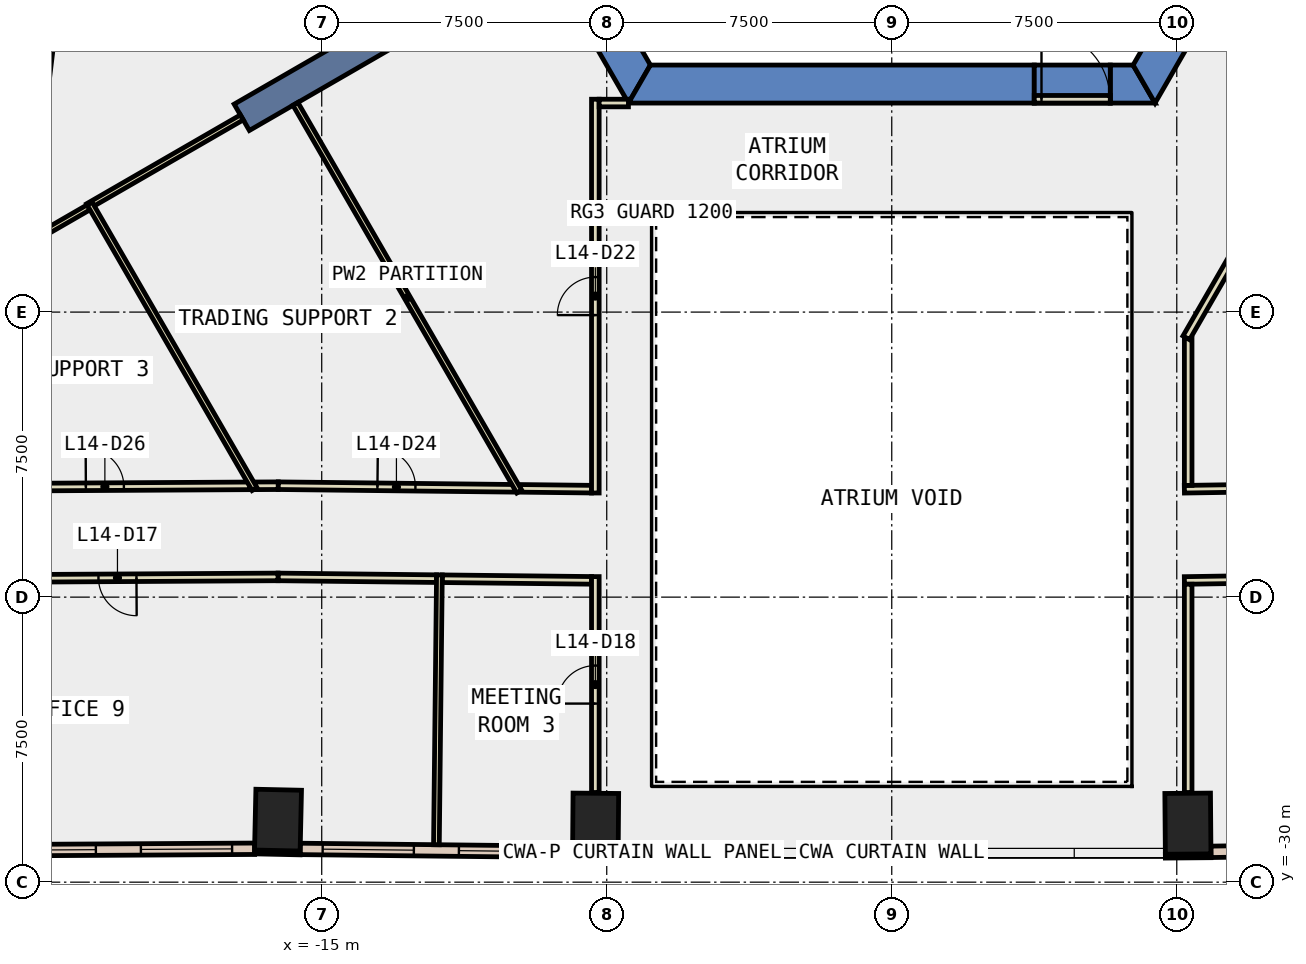
"""IFC4 building model, lengths in metres.
Left out: names, types, materials, properties, quantities, classifications, styles, units other than length and angle.
Written with IfcOpenShell. Run it as: python <this file> out.ifc"""

import sys

from ifc_helpers import new_model, si_unit, direction, frame, frame_2d, origin, origin_2d, place, context, subcontext, project, spatial, polyline, rectangle, outline, extrude, element, fill, save


model = new_model("IFC4")
c1 = context("Model", 3, precision=1e-05, world=origin(), true_north=direction((0.0, 1.0)))
c2 = subcontext(c1, "Body", "Model", "MODEL_VIEW")
j1 = project(units=[si_unit("LENGTHUNIT", "METRE"), si_unit("PLANEANGLEUNIT", "RADIAN")], contexts=[c1])
p1 = place(None, origin())
s1 = spatial("IfcSite", under=j1, at=p1, CompositionType="ELEMENT")
p2 = place(p1, origin())
s2 = spatial("IfcBuilding", under=s1, at=p2, CompositionType="ELEMENT")
p3 = place(p2, frame((0.0, 0.0, 68.6)))
s3 = spatial("IfcBuildingStorey", under=s2, at=p3, CompositionType="ELEMENT", Elevation=68.6)
for number, where, z_axis, x_axis in (
    (1, (-16.15, -28.368, -0.4), (0.0, 0.0, 1.0), (-1.0, 0.022, 0.0)),
    (2, (-7.793, -28.461, -0.4), (0.0, 0.0, 1.0), (-1.0, 0.008, 0.0)),
    (3, (7.793, -28.461, -0.4), (0.0, 0.0, 1.0), (1.0, 0.008, 0.0)),
):
    element("IfcColumn", number, at=place(p3, frame(where, z_axis=z_axis, x_axis=x_axis)), inside=s3, PredefinedType="COLUMN", context=c2, shape_type="SweptSolid", body=[
        extrude(rectangle(XDim=1.2, YDim=1.6, at=origin_2d()), origin(), (0.0, 0.0, 1.0), 4.2),
    ])
p4 = place(p3, frame((0.0, 0.0, -0.4)))
e4 = element("IfcWall", 4, at=p4, inside=s3, PredefinedType="SHEAR", context=c2, shape_type="SweptSolid", body=[
    extrude(outline(polyline([(-13.856, 2.5), (-6.928, -9.5), (-6.351, -8.5), (-12.702, 2.5), (-13.856, 2.5)])), origin(), (0.0, 0.0, 1.0), 4.2),
])
p5 = place(p3, frame((0.0, 0.0, -0.4)))
e5 = element("IfcWall", 5, at=p5, inside=s3, PredefinedType="SHEAR", context=c2, shape_type="SweptSolid", body=[
    extrude(outline(polyline([(3.75, -9.5), (3.75, -8.5), (-6.351, -8.5), (-6.928, -9.5), (3.75, -9.5)])), origin(), (0.0, 0.0, 1.0), 4.2),
])
p6 = place(p3, frame((0.0, 0.0, -0.4)))
e6 = element("IfcWall", 6, at=p6, inside=s3, PredefinedType="SHEAR", context=c2, shape_type="SweptSolid", body=[
    extrude(outline(polyline([(5.75, -8.5), (5.75, -9.5), (6.928, -9.5), (6.351, -8.5), (5.75, -8.5)])), origin(), (0.0, 0.0, 1.0), 4.2),
])
p7 = place(p3, frame((0.0, 0.0, 3.6)))
e7 = element("IfcWall", 7, at=p7, inside=s3, PredefinedType="SHEAR", context=c2, shape_type="SweptSolid", body=[
    extrude(outline(polyline([(5.75, -9.5), (5.75, -8.5), (3.75, -8.5), (3.75, -9.5), (5.75, -9.5)])), origin(), (0.0, 0.0, 1.0), 0.2),
])
p8 = place(p3, frame((0.0, 0.0, -0.4)))
e8 = element("IfcWall", 8, at=p8, inside=s3, PredefinedType="SHEAR", context=c2, shape_type="SweptSolid", body=[
    extrude(outline(polyline([(8.117, -7.44), (7.252, -6.94), (6.351, -8.5), (6.928, -9.5), (8.117, -7.44)])), origin(), (0.0, 0.0, 1.0), 4.2),
])
p9 = place(p3, frame((-9.31, -5.375, -0.4), z_axis=(0.0, 0.0, 1.0), x_axis=(-0.866017533419, -0.500013631625, 0.0)))
e9 = element("IfcWall", 9, at=p9, inside=s3, PredefinedType="SHEAR", context=c2, shape_type="SweptSolid", body=[
    extrude(rectangle(XDim=9.0, YDim=0.8, at=frame_2d((4.5, 0.0))), origin(), (0.0, 0.0, 1.0), 4.2),
])
p10 = place(p3, frame((-16.769, -29.205, 0.0), z_axis=(0.0, 0.0, 1.0), x_axis=(0.99976752127, -0.021561618973, 0.0)))
e10 = element("IfcWall", 10, at=p10, inside=s3, PredefinedType="STANDARD", context=c2, shape_type="SweptSolid", body=[
    extrude(rectangle(XDim=1.2, YDim=0.1, at=frame_2d((0.6, 0.0))), origin(), (0.0, 0.0, 1.0), 3.8),
])
for number, where, z_axis, x_axis in (
    (11, (-8.4, -29.306, 0.0), (0.0, 0.0, 1.0), (1.0, -0.008, 0.0)),
    (12, (7.2, -29.316, 0.0), (0.0, 0.0, 1.0), (1.0, 0.008, 0.0)),
):
    element("IfcWall", number, at=place(p3, frame(where, z_axis=z_axis, x_axis=x_axis)), inside=s3, PredefinedType="STANDARD", context=c2, shape_type="SweptSolid", body=[
        extrude(rectangle(XDim=1.2, YDim=0.1, at=frame_2d((0.6, 0.0))), origin(), (0.0, 0.0, 1.0), 3.8),
    ])
p11 = place(p3, frame((-23.936, -29.162, 0.0), z_axis=(0.0, 0.0, 1.0), x_axis=(0.999983638272, 0.005720418525, 0.0)))
e13 = element("IfcWall", 13, at=p11, inside=s3, PredefinedType="STANDARD", context=c2, shape_type="SweptSolid", body=[
    extrude(rectangle(XDim=7.17, YDim=0.3, at=frame_2d((3.585, 0.0))), origin(), (0.0, 0.0, 1.0), 3.8),
])
p12 = place(p11, frame((0.593, 0.0, 0.9)))
e14 = element("IfcOpeningElement", 14, at=p12, cuts=e13, PredefinedType="OPENING", context=c2, shape_type="SweptSolid", body=[
    extrude(rectangle(XDim=2.4, YDim=2.6, at=frame_2d((1.2, 1.3))), frame((0.0, 0.16, 0.0), z_axis=(0.0, -1.0, 0.0), x_axis=(1.0, 0.0, 0.0)), (0.0, 0.0, 1.0), 0.32),
])
p13 = place(p11, frame((4.178, 0.0, 0.9)))
e15 = element("IfcOpeningElement", 15, at=p13, cuts=e13, PredefinedType="OPENING", context=c2, shape_type="SweptSolid", body=[
    extrude(rectangle(XDim=2.4, YDim=2.6, at=frame_2d((1.2, 1.3))), frame((0.0, 0.16, 0.0), z_axis=(0.0, -1.0, 0.0), x_axis=(1.0, 0.0, 0.0)), (0.0, 0.0, 1.0), 0.32),
])
p14 = place(p3, frame((-15.568, -29.125, 0.0), z_axis=(0.0, 0.0, 1.0), x_axis=(0.999939152594, -0.011031369316, 0.0)))
e16 = element("IfcWall", 16, at=p14, inside=s3, PredefinedType="STANDARD", context=c2, shape_type="SweptSolid", body=[
    extrude(rectangle(XDim=7.171, YDim=0.3, at=frame_2d((3.585, 0.0))), origin(), (0.0, 0.0, 1.0), 3.8),
])
p15 = place(p14, frame((0.593, 0.0, 0.9)))
e17 = element("IfcOpeningElement", 17, at=p15, cuts=e16, PredefinedType="OPENING", context=c2, shape_type="SweptSolid", body=[
    extrude(rectangle(XDim=2.4, YDim=2.6, at=frame_2d((1.2, 1.3))), frame((0.0, 0.16, 0.0), z_axis=(0.0, -1.0, 0.0), x_axis=(1.0, 0.0, 0.0)), (0.0, 0.0, 1.0), 0.32),
])
p16 = place(p14, frame((4.178, 0.0, 0.9)))
e18 = element("IfcOpeningElement", 18, at=p16, cuts=e16, PredefinedType="OPENING", context=c2, shape_type="SweptSolid", body=[
    extrude(rectangle(XDim=2.4, YDim=2.6, at=frame_2d((1.2, 1.3))), frame((0.0, 0.16, 0.0), z_axis=(0.0, -1.0, 0.0), x_axis=(1.0, 0.0, 0.0)), (0.0, 0.0, 1.0), 0.32),
])
p17 = place(p3, frame((8.398, -29.202, 0.0), z_axis=(0.0, 0.0, 1.0), x_axis=(0.99988053916, 0.015456629942, 0.0)))
e19 = element("IfcWall", 19, at=p17, inside=s3, PredefinedType="STANDARD", context=c2, shape_type="SweptSolid", body=[
    extrude(rectangle(XDim=7.171, YDim=0.3, at=frame_2d((3.585, 0.0))), origin(), (0.0, 0.0, 1.0), 3.8),
])
p18 = place(p17, frame((0.593, 0.0, 0.9)))
e20 = element("IfcOpeningElement", 20, at=p18, cuts=e19, PredefinedType="OPENING", context=c2, shape_type="SweptSolid", body=[
    extrude(rectangle(XDim=2.4, YDim=2.6, at=frame_2d((1.2, 1.3))), frame((0.0, 0.16, 0.0), z_axis=(0.0, -1.0, 0.0), x_axis=(1.0, 0.0, 0.0)), (0.0, 0.0, 1.0), 0.32),
])
p19 = place(p17, frame((4.178, 0.0, 0.9)))
e21 = element("IfcOpeningElement", 21, at=p19, cuts=e19, PredefinedType="OPENING", context=c2, shape_type="SweptSolid", body=[
    extrude(rectangle(XDim=2.4, YDim=2.6, at=frame_2d((1.2, 1.3))), frame((0.0, 0.16, 0.0), z_axis=(0.0, -1.0, 0.0), x_axis=(1.0, 0.0, 0.0)), (0.0, 0.0, 1.0), 0.32),
])
p20 = place(p3, frame((7.7, -19.661, 0.0), z_axis=(0.0, 0.0, 1.0), x_axis=(0.999882138464, 0.015352823245, 0.0)))
e22 = element("IfcWall", 22, at=p20, inside=s3, PredefinedType="PARTITIONING", context=c2, shape_type="SweptSolid", body=[
    extrude(rectangle(XDim=8.269, YDim=0.2, at=frame_2d((4.135, 0.0))), origin(), (0.0, 0.0, 1.0), 3.8),
])
p21 = place(p20, frame((3.235, 0.0, 0.0)))
e23 = element("IfcOpeningElement", 23, at=p21, cuts=e22, PredefinedType="OPENING", context=c2, shape_type="SweptSolid", body=[
    extrude(rectangle(XDim=1.8, YDim=2.1, at=frame_2d((0.9, 1.05))), frame((0.0, 0.11, 0.0), z_axis=(0.0, -1.0, 0.0), x_axis=(1.0, 0.0, 0.0)), (0.0, 0.0, 1.0), 0.22),
])
p22 = place(p3, frame((-9.776, -19.638, 0.0), z_axis=(0.0, 0.0, 1.0), x_axis=(0.999937374473, -0.011191386544, 0.0)))
e24 = element("IfcWall", 24, at=p22, inside=s3, PredefinedType="PARTITIONING", context=c2, shape_type="SweptSolid", body=[
    extrude(rectangle(XDim=1.876, YDim=0.2, at=frame_2d((0.938, 0.0))), origin(), (0.0, 0.0, 1.0), 3.8),
])
p23 = place(p3, frame((-16.742, -19.571, 0.0), z_axis=(0.0, 0.0, 1.0), x_axis=(0.999988034534, 0.004891910483, 0.0)))
e25 = element("IfcWall", 25, at=p23, inside=s3, PredefinedType="PARTITIONING", context=c2, shape_type="SweptSolid", body=[
    extrude(rectangle(XDim=0.599, YDim=0.2, at=frame_2d((0.299, 0.0))), origin(), (0.0, 0.0, 1.0), 3.8),
])
p24 = place(p3, frame((-16.143, -19.568, 0.0), z_axis=(0.0, 0.0, 1.0), x_axis=(0.999938688645, -0.011073344206, 0.0)))
e26 = element("IfcWall", 26, at=p24, inside=s3, PredefinedType="PARTITIONING", context=c2, shape_type="SweptSolid", body=[
    extrude(rectangle(XDim=6.218, YDim=0.2, at=frame_2d((3.109, 0.0))), origin(), (0.0, 0.0, 1.0), 3.8),
])
p25 = place(p24, frame((2.609, 0.0, 0.0)))
e27 = element("IfcOpeningElement", 27, at=p25, cuts=e26, PredefinedType="OPENING", context=c2, shape_type="SweptSolid", body=[
    extrude(rectangle(XDim=1.0, YDim=2.1, at=frame_2d((0.5, 1.05))), frame((0.0, 0.11, 0.0), z_axis=(0.0, -1.0, 0.0), x_axis=(1.0, 0.0, 0.0)), (0.0, 0.0, 1.0), 0.22),
])
p26 = place(p3, frame((-24.52, -19.615, 0.0), z_axis=(0.0, 0.0, 1.0), x_axis=(0.999984134574, 0.00563299218, 0.0)))
e28 = element("IfcWall", 28, at=p26, inside=s3, PredefinedType="PARTITIONING", context=c2, shape_type="SweptSolid", body=[
    extrude(rectangle(XDim=7.628, YDim=0.2, at=frame_2d((3.814, 0.0))), origin(), (0.0, 0.0, 1.0), 3.8),
])
p27 = place(p26, frame((3.314, 0.0, 0.0)))
e29 = element("IfcOpeningElement", 29, at=p27, cuts=e28, PredefinedType="OPENING", context=c2, shape_type="SweptSolid", body=[
    extrude(rectangle(XDim=1.0, YDim=2.1, at=frame_2d((0.5, 1.05))), frame((0.0, 0.11, 0.0), z_axis=(0.0, -1.0, 0.0), x_axis=(1.0, 0.0, 0.0)), (0.0, 0.0, 1.0), 0.22),
])
p28 = place(p3, frame((16.018, -21.933, 0.0), z_axis=(0.0, 0.0, 1.0), x_axis=(-0.999879942341, -0.015495189738, 0.0)))
e30 = element("IfcWall", 30, at=p28, inside=s3, PredefinedType="PARTITIONING", context=c2, shape_type="SweptSolid", body=[
    extrude(rectangle(XDim=8.319, YDim=0.2, at=frame_2d((4.16, 0.0))), origin(), (0.0, 0.0, 1.0), 3.8),
])
p29 = place(p28, frame((3.66, 0.0, 0.0)))
e31 = element("IfcOpeningElement", 31, at=p29, cuts=e30, PredefinedType="OPENING", context=c2, shape_type="SweptSolid", body=[
    extrude(rectangle(XDim=1.0, YDim=2.1, at=frame_2d((0.5, 1.05))), frame((0.0, 0.11, 0.0), z_axis=(0.0, -1.0, 0.0), x_axis=(1.0, 0.0, 0.0)), (0.0, 0.0, 1.0), 0.22),
])
p30 = place(p3, frame((-11.979, -22.014, 0.0), z_axis=(0.0, 0.0, 1.0), x_axis=(-0.999939456554, 0.01100378236, 0.0)))
e32 = element("IfcWall", 32, at=p30, inside=s3, PredefinedType="PARTITIONING", context=c2, shape_type="SweptSolid", body=[
    extrude(rectangle(XDim=4.171, YDim=0.2, at=frame_2d((2.085, 0.0))), origin(), (0.0, 0.0, 1.0), 3.8),
])
p31 = place(p3, frame((-16.15, -21.968, 0.0), z_axis=(0.0, 0.0, 1.0), x_axis=(-0.99998433708, -0.00559692726, 0.0)))
e33 = element("IfcWall", 33, at=p31, inside=s3, PredefinedType="PARTITIONING", context=c2, shape_type="SweptSolid", body=[
    extrude(rectangle(XDim=8.375, YDim=0.2, at=frame_2d((4.188, 0.0))), origin(), (0.0, 0.0, 1.0), 3.8),
])
p32 = place(p31, frame((3.725, 0.0, 0.0)))
e34 = element("IfcOpeningElement", 34, at=p32, cuts=e33, PredefinedType="OPENING", context=c2, shape_type="SweptSolid", body=[
    extrude(rectangle(XDim=1.0, YDim=2.1, at=frame_2d((0.5, 1.05))), frame((0.0, 0.11, 0.0), z_axis=(0.0, -1.0, 0.0), x_axis=(1.0, 0.0, 0.0)), (0.0, 0.0, 1.0), 0.22),
])
p33 = place(p3, frame((-7.9, -22.059, 0.0), z_axis=(0.0, 0.0, 1.0), x_axis=(-0.999940210022, 0.010935098606, 0.0)))
e35 = element("IfcWall", 35, at=p33, inside=s3, PredefinedType="PARTITIONING", context=c2, shape_type="SweptSolid", body=[
    extrude(rectangle(XDim=3.929, YDim=0.2, at=frame_2d((1.965, 0.0))), origin(), (0.0, 0.0, 1.0), 3.8),
])
p34 = place(p3, frame((7.8, -15.69, 0.0), z_axis=(0.0, 0.0, 1.0), x_axis=(0.0, -1.0, 0.0)))
e36 = element("IfcWall", 36, at=p34, inside=s3, PredefinedType="PARTITIONING", context=c2, shape_type="SweptSolid", body=[
    extrude(rectangle(XDim=3.87, YDim=0.2, at=frame_2d((1.935, 0.0))), origin(), (0.0, 0.0, 1.0), 3.8),
])
p35 = place(p3, frame((-7.8, -19.76, 0.0), z_axis=(0.0, 0.0, 1.0), x_axis=(0.0, 1.0, 0.0)))
e37 = element("IfcWall", 37, at=p35, inside=s3, PredefinedType="PARTITIONING", context=c2, shape_type="SweptSolid", body=[
    extrude(rectangle(XDim=10.361, YDim=0.2, at=frame_2d((5.181, 0.0))), origin(), (0.0, 0.0, 1.0), 3.8),
])
p36 = place(p35, frame((4.681, 0.0, 0.0)))
e38 = element("IfcOpeningElement", 38, at=p36, cuts=e37, PredefinedType="OPENING", context=c2, shape_type="SweptSolid", body=[
    extrude(rectangle(XDim=1.0, YDim=2.1, at=frame_2d((0.5, 1.05))), frame((0.0, 0.11, 0.0), z_axis=(0.0, -1.0, 0.0), x_axis=(1.0, 0.0, 0.0)), (0.0, 0.0, 1.0), 0.22),
])
p37 = place(p3, frame((-7.7, -9.499, 0.0), z_axis=(0.0, 0.0, 1.0), x_axis=(1.0, 0.0, 0.0)))
e39 = element("IfcWall", 39, at=p37, inside=s3, PredefinedType="PARTITIONING", context=c2, shape_type="SweptSolid", body=[
    extrude(rectangle(XDim=0.771, YDim=0.2, at=frame_2d((0.385, 0.0))), origin(), (0.0, 0.0, 1.0), 3.8),
])
p38 = place(p3, frame((7.8, -22.16, 0.0), z_axis=(0.0, 0.0, 1.0), x_axis=(0.0, -1.0, 0.0)))
e40 = element("IfcWall", 40, at=p38, inside=s3, PredefinedType="PARTITIONING", context=c2, shape_type="SweptSolid", body=[
    extrude(rectangle(XDim=5.481, YDim=0.2, at=frame_2d((2.741, 0.0))), origin(), (0.0, 0.0, 1.0), 3.8),
])
p39 = place(p3, frame((-7.8, -27.641, 0.0), z_axis=(0.0, 0.0, 1.0), x_axis=(0.0, 1.0, 0.0)))
e41 = element("IfcWall", 41, at=p39, inside=s3, PredefinedType="PARTITIONING", context=c2, shape_type="SweptSolid", body=[
    extrude(rectangle(XDim=5.681, YDim=0.2, at=frame_2d((2.841, 0.0))), origin(), (0.0, 0.0, 1.0), 3.8),
])
p40 = place(p39, frame((2.34, 0.0, 0.0)))
e42 = element("IfcOpeningElement", 42, at=p40, cuts=e41, PredefinedType="OPENING", context=c2, shape_type="SweptSolid", body=[
    extrude(rectangle(XDim=1.0, YDim=2.1, at=frame_2d((0.5, 1.05))), frame((0.0, 0.11, 0.0), z_axis=(0.0, -1.0, 0.0), x_axis=(1.0, 0.0, 0.0)), (0.0, 0.0, 1.0), 0.22),
])
p41 = place(p3, frame((-22.403, -10.017, 0.0), z_axis=(0.0, 0.0, 1.0), x_axis=(0.119143334217, 0.992877064853, 0.0)))
e43 = element("IfcWall", 43, at=p41, inside=s3, PredefinedType="PARTITIONING", context=c2, shape_type="SweptSolid", body=[
    extrude(rectangle(XDim=10.207, YDim=0.2, at=frame_2d((5.104, 0.0))), origin(), (0.0, 0.0, 1.0), 3.8),
])
p42 = place(p3, frame((-9.801, -19.724, 0.0), z_axis=(0.0, 0.0, 1.0), x_axis=(-0.500005867738, 0.866022016018, 0.0)))
e44 = element("IfcWall", 44, at=p42, inside=s3, PredefinedType="PARTITIONING", context=c2, shape_type="SweptSolid", body=[
    extrude(rectangle(XDim=11.781, YDim=0.15, at=frame_2d((5.891, 0.0))), origin(), (0.0, 0.0, 1.0), 3.8),
])
p43 = place(p3, frame((-17.103, -9.878, 0.0), z_axis=(0.0, 0.0, 1.0), x_axis=(-0.866013358989, -0.500020861617, 0.0)))
e45 = element("IfcWall", 45, at=p43, inside=s3, PredefinedType="PARTITIONING", context=c2, shape_type="SweptSolid", body=[
    extrude(rectangle(XDim=4.674, YDim=0.15, at=frame_2d((2.337, 0.0))), origin(), (0.0, 0.0, 1.0), 3.8),
])
p44 = place(p3, frame((-21.135, -12.243, 0.0), z_axis=(0.0, 0.0, 1.0), x_axis=(-0.866083439347, -0.499899465982, 0.0)))
e46 = element("IfcWall", 46, at=p44, inside=s3, PredefinedType="PARTITIONING", context=c2, shape_type="SweptSolid", body=[
    extrude(rectangle(XDim=5.691, YDim=0.15, at=frame_2d((2.846, 0.0))), origin(), (0.0, 0.0, 1.0), 3.8),
])
p45 = place(p3, frame((-16.767, -19.658, 0.0), z_axis=(0.0, 0.0, 1.0), x_axis=(-0.500083586486, 0.865977139726, 0.0)))
e47 = element("IfcWall", 47, at=p45, inside=s3, PredefinedType="PARTITIONING", context=c2, shape_type="SweptSolid", body=[
    extrude(rectangle(XDim=8.68, YDim=0.15, at=frame_2d((4.34, 0.0))), origin(), (0.0, 0.0, 1.0), 3.8),
])
p46 = place(p3, frame((-11.903, -21.915, 0.0), z_axis=(0.0, 0.0, 1.0), x_axis=(-0.011106223261, -0.999938324, 0.0)))
e48 = element("IfcWall", 48, at=p46, inside=s3, PredefinedType="PARTITIONING", context=c2, shape_type="SweptSolid", body=[
    extrude(rectangle(XDim=7.1, YDim=0.15, at=frame_2d((3.55, 0.0))), origin(), (0.0, 0.0, 1.0), 3.8),
])
p47 = place(p3, frame((3.75, -9.4, 0.0), z_axis=(0.0, 0.0, 1.0), x_axis=(1.0, 0.0, 0.0)))
e49 = element("IfcWall", 49, at=p47, inside=s3, PredefinedType="PARTITIONING", context=c2, shape_type="SweptSolid", body=[
    extrude(rectangle(XDim=2.0, YDim=0.2, at=frame_2d((1.0, 0.0))), origin(), (0.0, 0.0, 1.0), 2.4),
])
p48 = place(p47, frame((0.19, 0.0, 0.0)))
e50 = element("IfcOpeningElement", 50, at=p48, cuts=e49, PredefinedType="OPENING", context=c2, shape_type="SweptSolid", body=[
    extrude(rectangle(XDim=1.8, YDim=2.1, at=frame_2d((0.9, 1.05))), frame((0.0, 0.11, 0.0), z_axis=(0.0, -1.0, 0.0), x_axis=(1.0, 0.0, 0.0)), (0.0, 0.0, 1.0), 0.22),
])
p49 = place(p3, frame((12.401, -7.622, 0.0), z_axis=(0.0, 0.0, 1.0), x_axis=(-0.500029185841, -0.866008552675, 0.0)))
e51 = element("IfcWall", 51, at=p49, inside=s3, PredefinedType="PARTITIONING", context=c2, shape_type="SweptSolid", body=[
    extrude(rectangle(XDim=9.301, YDim=0.2, at=frame_2d((4.651, 0.0))), origin(), (0.0, 0.0, 1.0), 3.8),
])
p50 = place(p12, origin())
e52 = element("IfcWindow", 52, at=p50, inside=s3, PartitioningType="SINGLE_PANEL", PredefinedType="WINDOW", context=c2, shape_type="SweptSolid", body=[
    extrude(rectangle(XDim=2.4, YDim=2.6, at=frame_2d((1.2, 1.3))), frame((0.0, 0.03, 0.0), z_axis=(0.0, -1.0, 0.0), x_axis=(1.0, 0.0, 0.0)), (0.0, 0.0, 1.0), 0.06),
])
fill(e14, e52)
p51 = place(p13, origin())
e53 = element("IfcWindow", 53, at=p51, inside=s3, PartitioningType="SINGLE_PANEL", PredefinedType="WINDOW", context=c2, shape_type="SweptSolid", body=[
    extrude(rectangle(XDim=2.4, YDim=2.6, at=frame_2d((1.2, 1.3))), frame((0.0, 0.03, 0.0), z_axis=(0.0, -1.0, 0.0), x_axis=(1.0, 0.0, 0.0)), (0.0, 0.0, 1.0), 0.06),
])
fill(e15, e53)
p52 = place(p15, origin())
e54 = element("IfcWindow", 54, at=p52, inside=s3, PartitioningType="SINGLE_PANEL", PredefinedType="WINDOW", context=c2, shape_type="SweptSolid", body=[
    extrude(rectangle(XDim=2.4, YDim=2.6, at=frame_2d((1.2, 1.3))), frame((0.0, 0.03, 0.0), z_axis=(0.0, -1.0, 0.0), x_axis=(1.0, 0.0, 0.0)), (0.0, 0.0, 1.0), 0.06),
])
fill(e17, e54)
p53 = place(p16, origin())
e55 = element("IfcWindow", 55, at=p53, inside=s3, PartitioningType="SINGLE_PANEL", PredefinedType="WINDOW", context=c2, shape_type="SweptSolid", body=[
    extrude(rectangle(XDim=2.4, YDim=2.6, at=frame_2d((1.2, 1.3))), frame((0.0, 0.03, 0.0), z_axis=(0.0, -1.0, 0.0), x_axis=(1.0, 0.0, 0.0)), (0.0, 0.0, 1.0), 0.06),
])
fill(e18, e55)
p54 = place(p32, origin())
e56 = element("IfcDoor", 56, at=p54, inside=s3, OperationType="SINGLE_SWING_RIGHT", PredefinedType="DOOR", context=c2, shape_type="SweptSolid", body=[
    extrude(rectangle(XDim=1.0, YDim=2.1, at=frame_2d((0.5, 1.05))), frame((0.0, 0.025, 0.0), z_axis=(0.0, -1.0, 0.0), x_axis=(1.0, 0.0, 0.0)), (0.0, 0.0, 1.0), 0.05),
])
fill(e34, e56)
p55 = place(p40, origin())
e57 = element("IfcDoor", 57, at=p55, inside=s3, OperationType="SINGLE_SWING_LEFT", PredefinedType="DOOR", context=c2, shape_type="SweptSolid", body=[
    extrude(rectangle(XDim=1.0, YDim=2.1, at=frame_2d((0.5, 1.05))), frame((0.0, 0.025, 0.0), z_axis=(0.0, -1.0, 0.0), x_axis=(1.0, 0.0, 0.0)), (0.0, 0.0, 1.0), 0.05),
])
fill(e42, e57)
p56 = place(p36, origin())
e58 = element("IfcDoor", 58, at=p56, inside=s3, OperationType="SINGLE_SWING_LEFT", PredefinedType="DOOR", context=c2, shape_type="SweptSolid", body=[
    extrude(rectangle(XDim=1.0, YDim=2.1, at=frame_2d((0.5, 1.05))), frame((0.0, 0.025, 0.0), z_axis=(0.0, -1.0, 0.0), x_axis=(1.0, 0.0, 0.0)), (0.0, 0.0, 1.0), 0.05),
])
fill(e38, e58)
p57 = place(p25, origin())
e59 = element("IfcDoor", 59, at=p57, inside=s3, OperationType="SINGLE_SWING_LEFT", PredefinedType="DOOR", context=c2, shape_type="SweptSolid", body=[
    extrude(rectangle(XDim=1.0, YDim=2.1, at=frame_2d((0.5, 1.05))), frame((0.0, 0.025, 0.0), z_axis=(0.0, -1.0, 0.0), x_axis=(1.0, 0.0, 0.0)), (0.0, 0.0, 1.0), 0.05),
])
fill(e27, e59)
p58 = place(p27, origin())
e60 = element("IfcDoor", 60, at=p58, inside=s3, OperationType="SINGLE_SWING_LEFT", PredefinedType="DOOR", context=c2, shape_type="SweptSolid", body=[
    extrude(rectangle(XDim=1.0, YDim=2.1, at=frame_2d((0.5, 1.05))), frame((0.0, 0.025, 0.0), z_axis=(0.0, -1.0, 0.0), x_axis=(1.0, 0.0, 0.0)), (0.0, 0.0, 1.0), 0.05),
])
fill(e29, e60)
p59 = place(p48, origin())
e61 = element("IfcDoor", 61, at=p59, inside=s3, OperationType="DOUBLE_DOOR_SINGLE_SWING", PredefinedType="DOOR", context=c2, shape_type="SweptSolid", body=[
    extrude(rectangle(XDim=1.8, YDim=2.1, at=frame_2d((0.9, 1.05))), frame((0.0, 0.025, 0.0), z_axis=(0.0, -1.0, 0.0), x_axis=(1.0, 0.0, 0.0)), (0.0, 0.0, 1.0), 0.05),
])
fill(e50, e61)
save(model, sys.argv[1])
